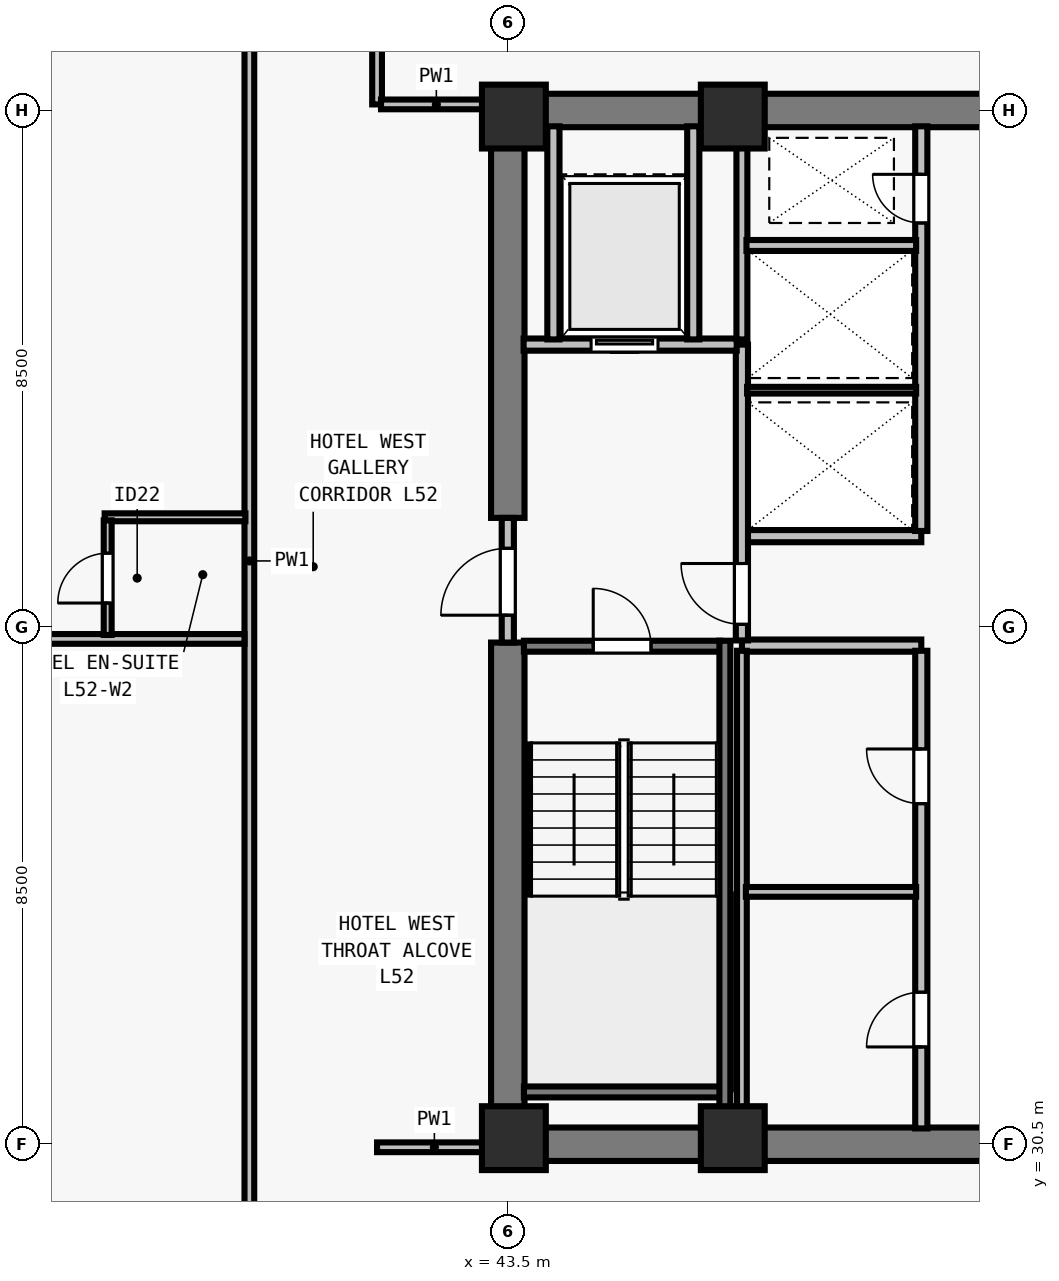
"""IFC4 building model, lengths in metres.
Left out: names, types, materials, properties, quantities, classifications, styles, units other than length and angle.
Written with IfcOpenShell. Run it as: python <this file> out.ifc"""

import sys

from ifc_helpers import new_model, si_unit, direction, frame, frame_2d, origin, origin_2d, place, context, subcontext, project, spatial, rectangle, extrude, element, fill, save


model = new_model("IFC4")
c1 = context("Model", 3, precision=1e-05, world=origin(), true_north=direction((0.0, 1.0)))
c2 = subcontext(c1, "Body", "Model", "MODEL_VIEW")
j1 = project(units=[si_unit("LENGTHUNIT", "METRE"), si_unit("PLANEANGLEUNIT", "RADIAN")], contexts=[c1])
p1 = place(None, origin())
s1 = spatial("IfcSite", under=j1, at=p1, CompositionType="ELEMENT")
p2 = place(p1, origin())
s2 = spatial("IfcBuilding", under=s1, at=p2, CompositionType="ELEMENT")
p3 = place(p2, frame((0.0, 0.0, 190.0)))
s3 = spatial("IfcBuildingStorey", under=s2, at=p3, CompositionType="ELEMENT", Elevation=190.0)
for number, where, z_axis, x_axis in (
    (1, (43.6, 30.6, 0.0), (0.0, 0.0, 1.0), (1.0, 0.0, 0.0)),
    (2, (47.2, 30.6, 0.0), (0.0, 0.0, 1.0), (1.0, 0.0, 0.0)),
    (3, (43.6, 47.4, 0.0), (0.0, 0.0, 1.0), (1.0, 0.0, 0.0)),
    (4, (47.2, 47.4, 0.0), (0.0, 0.0, 1.0), (1.0, 0.0, 0.0)),
):
    element("IfcColumn", number, at=place(p3, frame(where, z_axis=z_axis, x_axis=x_axis)), inside=s3, PredefinedType="COLUMN", context=c2, shape_type="SweptSolid", body=[
        extrude(rectangle(XDim=1.05, YDim=1.05, at=origin_2d()), origin(), (0.0, 0.0, 1.0), 3.5),
    ])
for number, where, z_axis, x_axis in (
    (5, (43.225, 30.5, 0.0), (0.0, 0.0, 1.0), (1.0, 0.0, 0.0)),
    (6, (43.225, 47.5, 0.0), (0.0, 0.0, 1.0), (1.0, 0.0, 0.0)),
):
    element("IfcWall", number, at=place(p3, frame(where, z_axis=z_axis, x_axis=x_axis)), inside=s3, PredefinedType="SHEAR", context=c2, shape_type="SweptSolid", body=[
        extrude(rectangle(XDim=17.55, YDim=0.55, at=frame_2d((8.775, 0.0))), origin(), (0.0, 0.0, 1.0), 3.24),
    ])
p4 = place(p3, frame((43.5, 30.765, 0.0), z_axis=(0.0, 0.0, 1.0), x_axis=(0.0, 1.0, 0.0)))
e7 = element("IfcWall", 7, at=p4, inside=s3, PredefinedType="SHEAR", context=c2, shape_type="SweptSolid", body=[
    extrude(rectangle(XDim=7.985, YDim=0.55, at=frame_2d((3.993, 0.0))), origin(), (0.0, 0.0, 1.0), 3.24),
])
p5 = place(p3, frame((43.5, 40.8, 0.0), z_axis=(0.0, 0.0, 1.0), x_axis=(0.0, 1.0, 0.0)))
e8 = element("IfcWall", 8, at=p5, inside=s3, PredefinedType="SHEAR", context=c2, shape_type="SweptSolid", body=[
    extrude(rectangle(XDim=6.435, YDim=0.55, at=frame_2d((3.218, 0.0))), origin(), (0.0, 0.0, 1.0), 3.24),
])
for number, where, z_axis, x_axis in (
    (9, (47.35, 38.7, 0.0), (0.0, 0.0, 1.0), (1.0, 0.0, 0.0)),
    (10, (47.35, 40.5, 0.0), (0.0, 0.0, 1.0), (1.0, 0.0, 0.0)),
):
    element("IfcWall", number, at=place(p3, frame(where, z_axis=z_axis, x_axis=x_axis)), inside=s3, PredefinedType="SOLIDWALL", context=c2, shape_type="SweptSolid", body=[
        extrude(rectangle(XDim=2.95, YDim=0.2, at=frame_2d((1.475, 0.0))), origin(), (0.0, 0.0, 1.0), 3.24),
    ])
p6 = place(p3, frame((50.3, 30.76, 0.0), z_axis=(0.0, 0.0, 1.0), x_axis=(0.0, 1.0, 0.0)))
e11 = element("IfcWall", 11, at=p6, inside=s3, PredefinedType="SOLIDWALL", context=c2, shape_type="SweptSolid", body=[
    extrude(rectangle(XDim=7.855, YDim=0.2, at=frame_2d((3.927, 0.0))), origin(), (0.0, 0.0, 1.0), 3.24),
])
p7 = place(p6, frame((1.34, 0.0, 0.0)))
e12 = element("IfcOpeningElement", 12, at=p7, cuts=e11, PredefinedType="OPENING", context=c2, shape_type="SweptSolid", body=[
    extrude(rectangle(XDim=0.9, YDim=2.12, at=frame_2d((0.45, 1.06))), frame((0.0, 0.11, 0.0), z_axis=(0.0, -1.0, 0.0), x_axis=(1.0, 0.0, 0.0)), (0.0, 0.0, 1.0), 0.22),
])
p8 = place(p6, frame((5.34, 0.0, 0.0)))
e13 = element("IfcOpeningElement", 13, at=p8, cuts=e11, PredefinedType="OPENING", context=c2, shape_type="SweptSolid", body=[
    extrude(rectangle(XDim=0.9, YDim=2.12, at=frame_2d((0.45, 1.06))), frame((0.0, 0.11, 0.0), z_axis=(0.0, -1.0, 0.0), x_axis=(1.0, 0.0, 0.0)), (0.0, 0.0, 1.0), 0.22),
])
p9 = place(p3, frame((50.3, 40.585, 0.0), z_axis=(0.0, 0.0, 1.0), x_axis=(0.0, 1.0, 0.0)))
e14 = element("IfcWall", 14, at=p9, inside=s3, PredefinedType="SOLIDWALL", context=c2, shape_type="SweptSolid", body=[
    extrude(rectangle(XDim=6.655, YDim=0.2, at=frame_2d((3.328, 0.0))), origin(), (0.0, 0.0, 1.0), 3.24),
])
p10 = place(p9, frame((5.065, 0.0, 0.0)))
e15 = element("IfcOpeningElement", 15, at=p10, cuts=e14, PredefinedType="OPENING", context=c2, shape_type="SweptSolid", body=[
    extrude(rectangle(XDim=0.8, YDim=2.08, at=frame_2d((0.4, 1.04))), frame((0.0, 0.11, 0.0), z_axis=(0.0, -1.0, 0.0), x_axis=(1.0, 0.0, 0.0)), (0.0, 0.0, 1.0), 0.22),
])
p11 = place(p3, frame((43.5, 38.75, 0.0), z_axis=(0.0, 0.0, 1.0), x_axis=(0.0, 1.0, 0.0)))
e16 = element("IfcWall", 16, at=p11, inside=s3, PredefinedType="SOLIDWALL", context=c2, shape_type="SweptSolid", body=[
    extrude(rectangle(XDim=2.05, YDim=0.2, at=frame_2d((1.025, 0.0))), origin(), (0.0, 0.0, 1.0), 3.24),
])
p12 = place(p11, frame((0.45, 0.0, 0.0)))
e17 = element("IfcOpeningElement", 17, at=p12, cuts=e16, PredefinedType="OPENING", context=c2, shape_type="SweptSolid", body=[
    extrude(rectangle(XDim=1.1, YDim=2.15, at=frame_2d((0.55, 1.075))), frame((0.0, 0.11, 0.0), z_axis=(0.0, -1.0, 0.0), x_axis=(1.0, 0.0, 0.0)), (0.0, 0.0, 1.0), 0.22),
])
p13 = place(p3, frame((47.35, 38.785, 0.0), z_axis=(0.0, 0.0, 1.0), x_axis=(0.0, 1.0, 0.0)))
e18 = element("IfcWall", 18, at=p13, inside=s3, PredefinedType="SOLIDWALL", context=c2, shape_type="SweptSolid", body=[
    extrude(rectangle(XDim=4.865, YDim=0.2, at=frame_2d((2.433, 0.0))), origin(), (0.0, 0.0, 1.0), 3.24),
])
p14 = place(p13, frame((0.265, 0.0, 0.0)))
e19 = element("IfcOpeningElement", 19, at=p14, cuts=e18, PredefinedType="OPENING", context=c2, shape_type="SweptSolid", body=[
    extrude(rectangle(XDim=1.0, YDim=2.15, at=frame_2d((0.5, 1.075))), frame((0.0, 0.11, 0.0), z_axis=(0.0, -1.0, 0.0), x_axis=(1.0, 0.0, 0.0)), (0.0, 0.0, 1.0), 0.22),
])
p15 = place(p3, frame((43.76, 43.65, 0.0), z_axis=(0.0, 0.0, 1.0), x_axis=(1.0, 0.0, 0.0)))
e20 = element("IfcWall", 20, at=p15, inside=s3, PredefinedType="SOLIDWALL", context=c2, shape_type="SweptSolid", body=[
    extrude(rectangle(XDim=3.505, YDim=0.2, at=frame_2d((1.752, 0.0))), origin(), (0.0, 0.0, 1.0), 3.24),
])
p16 = place(p15, frame((1.11, 0.0, 0.0)))
e21 = element("IfcOpeningElement", 21, at=p16, cuts=e20, PredefinedType="OPENING", context=c2, shape_type="SweptSolid", body=[
    extrude(rectangle(XDim=1.1, YDim=2.2, at=frame_2d((0.55, 1.1))), frame((0.0, 0.11, 0.0), z_axis=(0.0, -1.0, 0.0), x_axis=(1.0, 0.0, 0.0)), (0.0, 0.0, 1.0), 0.22),
])
for number, where, z_axis, x_axis in (
    (22, (46.55, 43.735, 0.0), (0.0, 0.0, 1.0), (0.0, 1.0, 0.0)),
    (23, (44.25, 43.735, 0.0), (0.0, 0.0, 1.0), (0.0, 1.0, 0.0)),
):
    element("IfcWall", number, at=place(p3, frame(where, z_axis=z_axis, x_axis=x_axis)), inside=s3, PredefinedType="SOLIDWALL", context=c2, shape_type="SweptSolid", body=[
        extrude(rectangle(XDim=3.505, YDim=0.2, at=frame_2d((1.752, 0.0))), origin(), (0.0, 0.0, 1.0), 3.24),
    ])
p17 = place(p3, frame((47.35, 30.76, 0.0), z_axis=(0.0, 0.0, 1.0), x_axis=(0.0, 1.0, 0.0)))
e24 = element("IfcWall", 24, at=p17, inside=s3, PredefinedType="PARTITIONING", context=c2, shape_type="SweptSolid", body=[
    extrude(rectangle(XDim=7.855, YDim=0.16, at=frame_2d((3.927, 0.0))), origin(), (0.0, 0.0, 1.0), 3.24),
])
p18 = place(p3, frame((47.415, 34.65, 0.0), z_axis=(0.0, 0.0, 1.0), x_axis=(1.0, 0.0, 0.0)))
e25 = element("IfcWall", 25, at=p18, inside=s3, PredefinedType="PARTITIONING", context=c2, shape_type="SweptSolid", body=[
    extrude(rectangle(XDim=2.8, YDim=0.16, at=frame_2d((1.4, 0.0))), origin(), (0.0, 0.0, 1.0), 3.24),
])
p19 = place(p3, frame((47.35, 43.735, 0.0), z_axis=(0.0, 0.0, 1.0), x_axis=(0.0, 1.0, 0.0)))
e26 = element("IfcWall", 26, at=p19, inside=s3, PredefinedType="SOLIDWALL", context=c2, shape_type="SweptSolid", body=[
    extrude(rectangle(XDim=3.505, YDim=0.18, at=frame_2d((1.752, 0.0))), origin(), (0.0, 0.0, 1.0), 3.24),
])
p20 = place(p3, frame((47.435, 42.9, 0.0), z_axis=(0.0, 0.0, 1.0), x_axis=(1.0, 0.0, 0.0)))
e27 = element("IfcWall", 27, at=p20, inside=s3, PredefinedType="PARTITIONING", context=c2, shape_type="SweptSolid", body=[
    extrude(rectangle(XDim=2.78, YDim=0.11, at=frame_2d((1.39, 0.0))), origin(), (0.0, 0.0, 1.0), 3.24),
])
p21 = place(p3, frame((47.425, 45.28, 0.0), z_axis=(0.0, 0.0, 1.0), x_axis=(1.0, 0.0, 0.0)))
e28 = element("IfcWall", 28, at=p21, inside=s3, PredefinedType="SOLIDWALL", context=c2, shape_type="SweptSolid", body=[
    extrude(rectangle(XDim=2.79, YDim=0.18, at=frame_2d((1.395, 0.0))), origin(), (0.0, 0.0, 1.0), 3.24),
])
p22 = place(p3, frame((39.25, 15.325, 0.0), z_axis=(0.0, 0.0, 1.0), x_axis=(0.0, 1.0, 0.0)))
e29 = element("IfcWall", 29, at=p22, inside=s3, PredefinedType="PARTITIONING", context=c2, shape_type="SweptSolid", body=[
    extrude(rectangle(XDim=47.35, YDim=0.16, at=frame_2d((23.675, 0.0))), origin(), (0.0, 0.0, 1.0), 2.515),
])
p23 = place(p22, frame((12.61, 0.0, 0.0)))
e30 = element("IfcOpeningElement", 30, at=p23, cuts=e29, PredefinedType="OPENING", context=c2, shape_type="SweptSolid", body=[
    extrude(rectangle(XDim=0.96, YDim=2.15, at=frame_2d((0.48, 1.075))), frame((0.0, 0.09, 0.0), z_axis=(0.0, -1.0, 0.0), x_axis=(1.0, 0.0, 0.0)), (0.0, 0.0, 1.0), 0.18),
])
p24 = place(p22, frame((35.965, 0.0, 0.0)))
e31 = element("IfcOpeningElement", 31, at=p24, cuts=e29, PredefinedType="OPENING", context=c2, shape_type="SweptSolid", body=[
    extrude(rectangle(XDim=0.96, YDim=2.15, at=frame_2d((0.48, 1.075))), frame((0.0, 0.09, 0.0), z_axis=(0.0, -1.0, 0.0), x_axis=(1.0, 0.0, 0.0)), (0.0, 0.0, 1.0), 0.18),
])
p25 = place(p3, frame((41.35, 47.6, 0.0), z_axis=(0.0, 0.0, 1.0), x_axis=(0.0, 1.0, 0.0)))
e32 = element("IfcWall", 32, at=p25, inside=s3, PredefinedType="PARTITIONING", context=c2, shape_type="SweptSolid", body=[
    extrude(rectangle(XDim=15.075, YDim=0.16, at=frame_2d((7.538, 0.0))), origin(), (0.0, 0.0, 1.0), 2.515),
])
p26 = place(p25, frame((3.5, 0.0, 0.0)))
e33 = element("IfcOpeningElement", 33, at=p26, cuts=e32, PredefinedType="OPENING", context=c2, shape_type="SweptSolid", body=[
    extrude(rectangle(XDim=0.96, YDim=2.12, at=frame_2d((0.48, 1.06))), frame((0.0, 0.09, 0.0), z_axis=(0.0, -1.0, 0.0), x_axis=(1.0, 0.0, 0.0)), (0.0, 0.0, 1.0), 0.18),
])
p27 = place(p3, frame((41.35, 30.45, 0.0), z_axis=(0.0, 0.0, 1.0), x_axis=(1.0, 0.0, 0.0)))
e34 = element("IfcWall", 34, at=p27, inside=s3, PredefinedType="PARTITIONING", context=c2, shape_type="SweptSolid", body=[
    extrude(rectangle(XDim=1.885, YDim=0.16, at=frame_2d((0.942, 0.0))), origin(), (0.0, 0.0, 1.0), 3.24),
])
p28 = place(p3, frame((41.415, 47.6, 0.0), z_axis=(0.0, 0.0, 1.0), x_axis=(1.0, 0.0, 0.0)))
e35 = element("IfcWall", 35, at=p28, inside=s3, PredefinedType="PARTITIONING", context=c2, shape_type="SweptSolid", body=[
    extrude(rectangle(XDim=1.82, YDim=0.16, at=frame_2d((0.91, 0.0))), origin(), (0.0, 0.0, 1.0), 3.24),
])
p29 = place(p3, frame((28.325, 38.81, 0.0), z_axis=(0.0, 0.0, 1.0), x_axis=(1.0, 0.0, 0.0)))
e36 = element("IfcWall", 36, at=p29, inside=s3, PredefinedType="PARTITIONING", context=c2, shape_type="SweptSolid", body=[
    extrude(rectangle(XDim=10.845, YDim=0.16, at=frame_2d((5.422, 0.0))), origin(), (0.0, 0.0, 1.0), 2.856),
])
p30 = place(p3, frame((36.87, 40.81, 0.0), z_axis=(0.0, 0.0, 1.0), x_axis=(1.0, 0.0, 0.0)))
e37 = element("IfcWall", 37, at=p30, inside=s3, PredefinedType="PLUMBINGWALL", context=c2, shape_type="SweptSolid", body=[
    extrude(rectangle(XDim=2.315, YDim=0.13, at=frame_2d((1.157, 0.0))), origin(), (0.0, 0.0, 1.0), 3.24),
])
p31 = place(p3, frame((36.92, 38.875, 0.0), z_axis=(0.0, 0.0, 1.0), x_axis=(0.0, 1.0, 0.0)))
e38 = element("IfcWall", 38, at=p31, inside=s3, PredefinedType="PLUMBINGWALL", context=c2, shape_type="SweptSolid", body=[
    extrude(rectangle(XDim=1.885, YDim=0.13, at=frame_2d((0.942, 0.0))), origin(), (0.0, 0.0, 1.0), 3.24),
])
p32 = place(p31, frame((0.525, 0.0, 0.0)))
e39 = element("IfcOpeningElement", 39, at=p32, cuts=e38, PredefinedType="OPENING", context=c2, shape_type="SweptSolid", body=[
    extrude(rectangle(XDim=0.82, YDim=2.1, at=frame_2d((0.41, 1.05))), frame((0.0, 0.075, 0.0), z_axis=(0.0, -1.0, 0.0), x_axis=(1.0, 0.0, 0.0)), (0.0, 0.0, 1.0), 0.15),
])
p33 = place(p3, frame((43.765, 38.69, 0.0), z_axis=(0.0, 0.0, 1.0), x_axis=(1.0, 0.0, 0.0)))
e40 = element("IfcWall", 40, at=p33, inside=s3, PredefinedType="SOLIDWALL", context=c2, shape_type="SweptSolid", body=[
    extrude(rectangle(XDim=3.23, YDim=0.18, at=frame_2d((1.615, 0.0))), origin(), (0.0, 0.0, 1.0), 3.24),
])
p34 = place(p33, frame((1.14, 0.0, 0.0)))
e41 = element("IfcOpeningElement", 41, at=p34, cuts=e40, PredefinedType="OPENING", context=c2, shape_type="SweptSolid", body=[
    extrude(rectangle(XDim=0.95, YDim=2.15, at=frame_2d((0.475, 1.075))), frame((0.0, 0.1, 0.0), z_axis=(0.0, -1.0, 0.0), x_axis=(1.0, 0.0, 0.0)), (0.0, 0.0, 1.0), 0.2),
])
p35 = place(p3, frame((43.765, 31.36, 0.0), z_axis=(0.0, 0.0, 1.0), x_axis=(1.0, 0.0, 0.0)))
e42 = element("IfcWall", 42, at=p35, inside=s3, PredefinedType="SOLIDWALL", context=c2, shape_type="SweptSolid", body=[
    extrude(rectangle(XDim=3.23, YDim=0.18, at=frame_2d((1.615, 0.0))), origin(), (0.0, 0.0, 1.0), 3.24),
])
p36 = place(p3, frame((47.07, 38.78, 0.0), z_axis=(0.0, 0.0, 1.0), x_axis=(0.0, -1.0, 0.0)))
e43 = element("IfcWall", 43, at=p36, inside=s3, PredefinedType="SOLIDWALL", context=c2, shape_type="SweptSolid", body=[
    extrude(rectangle(XDim=8.017, YDim=0.18, at=frame_2d((4.009, 0.0))), origin(), (0.0, 0.0, 1.0), 3.24),
])
p37 = place(p12, origin())
e44 = element("IfcDoor", 44, at=p37, inside=s3, OperationType="SINGLE_SWING_LEFT", PredefinedType="DOOR", context=c2, shape_type="SweptSolid", body=[
    extrude(rectangle(XDim=1.1, YDim=2.15, at=frame_2d((0.55, 1.075))), frame((0.0, 0.025, 0.0), z_axis=(0.0, -1.0, 0.0), x_axis=(1.0, 0.0, 0.0)), (0.0, 0.0, 1.0), 0.05),
])
fill(e17, e44)
p38 = place(p14, origin())
e45 = element("IfcDoor", 45, at=p38, inside=s3, OperationType="SINGLE_SWING_RIGHT", PredefinedType="DOOR", context=c2, shape_type="SweptSolid", body=[
    extrude(rectangle(XDim=1.0, YDim=2.15, at=frame_2d((0.5, 1.075))), frame((0.0, 0.025, 0.0), z_axis=(0.0, -1.0, 0.0), x_axis=(1.0, 0.0, 0.0)), (0.0, 0.0, 1.0), 0.05),
])
fill(e19, e45)
p39 = place(p16, origin())
e46 = element("IfcDoor", 46, at=p39, inside=s3, OperationType="SLIDING_TO_LEFT", PredefinedType="DOOR", context=c2, shape_type="SweptSolid", body=[
    extrude(rectangle(XDim=1.1, YDim=2.2, at=frame_2d((0.55, 1.1))), frame((0.0, 0.025, 0.0), z_axis=(0.0, -1.0, 0.0), x_axis=(1.0, 0.0, 0.0)), (0.0, 0.0, 1.0), 0.05),
])
fill(e21, e46)
p40 = place(p7, origin())
e47 = element("IfcDoor", 47, at=p40, inside=s3, OperationType="SINGLE_SWING_LEFT", PredefinedType="DOOR", context=c2, shape_type="SweptSolid", body=[
    extrude(rectangle(XDim=0.9, YDim=2.12, at=frame_2d((0.45, 1.06))), frame((0.0, 0.025, 0.0), z_axis=(0.0, -1.0, 0.0), x_axis=(1.0, 0.0, 0.0)), (0.0, 0.0, 1.0), 0.05),
])
fill(e12, e47)
p41 = place(p8, origin())
e48 = element("IfcDoor", 48, at=p41, inside=s3, OperationType="SINGLE_SWING_RIGHT", PredefinedType="DOOR", context=c2, shape_type="SweptSolid", body=[
    extrude(rectangle(XDim=0.9, YDim=2.12, at=frame_2d((0.45, 1.06))), frame((0.0, 0.025, 0.0), z_axis=(0.0, -1.0, 0.0), x_axis=(1.0, 0.0, 0.0)), (0.0, 0.0, 1.0), 0.05),
])
fill(e13, e48)
p42 = place(p10, origin())
e49 = element("IfcDoor", 49, at=p42, inside=s3, OperationType="SINGLE_SWING_RIGHT", PredefinedType="DOOR", context=c2, shape_type="SweptSolid", body=[
    extrude(rectangle(XDim=0.8, YDim=2.08, at=frame_2d((0.4, 1.04))), frame((0.0, 0.025, 0.0), z_axis=(0.0, -1.0, 0.0), x_axis=(1.0, 0.0, 0.0)), (0.0, 0.0, 1.0), 0.05),
])
fill(e15, e49)
p43 = place(p32, origin())
e50 = element("IfcDoor", 50, at=p43, inside=s3, OperationType="SINGLE_SWING_LEFT", PredefinedType="DOOR", context=c2, shape_type="SweptSolid", body=[
    extrude(rectangle(XDim=0.82, YDim=2.1, at=frame_2d((0.41, 1.05))), frame((0.0, 0.025, 0.0), z_axis=(0.0, -1.0, 0.0), x_axis=(1.0, 0.0, 0.0)), (0.0, 0.0, 1.0), 0.05),
])
fill(e39, e50)
p44 = place(p34, origin())
e51 = element("IfcDoor", 51, at=p44, inside=s3, OperationType="SINGLE_SWING_LEFT", PredefinedType="DOOR", context=c2, shape_type="SweptSolid", body=[
    extrude(rectangle(XDim=0.95, YDim=2.15, at=frame_2d((0.475, 1.075))), frame((0.0, 0.025, 0.0), z_axis=(0.0, -1.0, 0.0), x_axis=(1.0, 0.0, 0.0)), (0.0, 0.0, 1.0), 0.05),
])
fill(e41, e51)
save(model, sys.argv[1])
